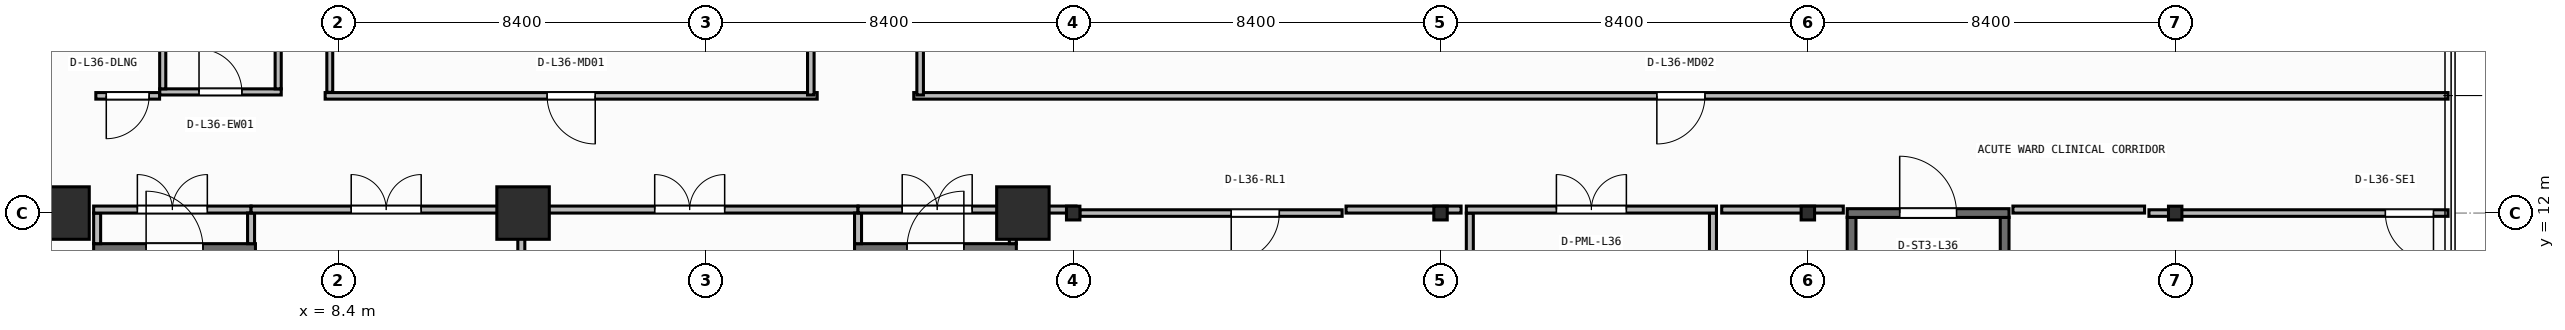
"""IFC4 building model, lengths in metres.
Left out: names, types, materials, properties, quantities, classifications, styles, units other than length and angle.
Written with IfcOpenShell. Run it as: python <this file> out.ifc"""

import sys

from ifc_helpers import new_model, si_unit, direction, frame, frame_2d, origin, origin_2d, place, context, subcontext, project, spatial, rectangle, i_section, extrude, element, fill, save


model = new_model("IFC4")
c1 = context("Model", 3, precision=1e-05, world=origin(), true_north=direction((0.0, 1.0)))
c2 = subcontext(c1, "Body", "Model", "MODEL_VIEW")
j1 = project(units=[si_unit("LENGTHUNIT", "METRE"), si_unit("PLANEANGLEUNIT", "RADIAN")], contexts=[c1])
p1 = place(None, origin())
s1 = spatial("IfcSite", under=j1, at=p1, CompositionType="ELEMENT")
p2 = place(p1, origin())
s2 = spatial("IfcBuilding", under=s1, at=p2, CompositionType="ELEMENT")
p3 = place(p2, frame((0.0, 0.0, 146.8)))
s3 = spatial("IfcBuildingStorey", under=s2, at=p3, CompositionType="ELEMENT", Elevation=146.8)
for number, where, z_axis, x_axis in (
    (1, (2.1, 12.0, 0.0), (0.0, 0.0, 1.0), (1.0, 0.0, 0.0)),
    (2, (12.62, 12.0, 0.0), (0.0, 0.0, 1.0), (1.0, 0.0, 0.0)),
    (3, (24.05, 12.0, 0.0), (0.0, 0.0, 1.0), (1.0, 0.0, 0.0)),
):
    element("IfcColumn", number, at=place(p3, frame(where, z_axis=z_axis, x_axis=x_axis)), inside=s3, PredefinedType="COLUMN", context=c2, shape_type="SweptSolid", body=[
        extrude(rectangle(XDim=1.2, YDim=1.2, at=origin_2d()), origin(), (0.0, 0.0, 1.0), 3.95),
    ])
for number, where, z_axis, x_axis in (
    (4, (25.2, 12.0, 0.0), (0.0, 0.0, 1.0), (1.0, 0.0, 0.0)),
    (5, (33.6, 12.0, 0.0), (0.0, 0.0, 1.0), (1.0, 0.0, 0.0)),
    (6, (42.0, 12.0, 0.0), (0.0, 0.0, 1.0), (1.0, 0.0, 0.0)),
    (7, (50.4, 12.0, 0.0), (0.0, 0.0, 1.0), (1.0, 0.0, 0.0)),
):
    element("IfcColumn", number, at=place(p3, frame(where, z_axis=z_axis, x_axis=x_axis)), inside=s3, PredefinedType="COLUMN", context=c2, shape_type="SweptSolid", body=[
        extrude(i_section(OverallWidth=0.307, OverallDepth=0.315, WebThickness=0.012, FlangeThickness=0.019, FilletRadius=0.017, at=origin_2d()), origin(), (0.0, 0.0, 1.0), 3.95),
    ])
p4 = place(p3, frame((2.8, 11.2, 0.0), z_axis=(0.0, 0.0, 1.0), x_axis=(1.0, 0.0, 0.0)))
e8 = element("IfcWall", 8, at=p4, inside=s3, PredefinedType="SHEAR", context=c2, shape_type="SweptSolid", body=[
    extrude(rectangle(XDim=3.7, YDim=0.2, at=frame_2d((1.85, 0.0))), origin(), (0.0, 0.0, 1.0), 3.71),
])
p5 = place(p4, frame((1.2, 0.0, 0.0)))
e9 = element("IfcOpeningElement", 9, at=p5, cuts=e8, PredefinedType="OPENING", context=c2, shape_type="SweptSolid", body=[
    extrude(rectangle(XDim=1.3, YDim=2.15, at=frame_2d((0.65, 1.075))), frame((0.0, 0.11, 0.0), z_axis=(0.0, -1.0, 0.0), x_axis=(1.0, 0.0, 0.0)), (0.0, 0.0, 1.0), 0.22),
])
p6 = place(p3, frame((20.2, 11.2, 0.0), z_axis=(0.0, 0.0, 1.0), x_axis=(1.0, 0.0, 0.0)))
e10 = element("IfcWall", 10, at=p6, inside=s3, PredefinedType="SHEAR", context=c2, shape_type="SweptSolid", body=[
    extrude(rectangle(XDim=3.7, YDim=0.2, at=frame_2d((1.85, 0.0))), origin(), (0.0, 0.0, 1.0), 3.71),
])
p7 = place(p6, frame((1.2, 0.0, 0.0)))
e11 = element("IfcOpeningElement", 11, at=p7, cuts=e10, PredefinedType="OPENING", context=c2, shape_type="SweptSolid", body=[
    extrude(rectangle(XDim=1.3, YDim=2.15, at=frame_2d((0.65, 1.075))), frame((0.0, 0.11, 0.0), z_axis=(0.0, -1.0, 0.0), x_axis=(1.0, 0.0, 0.0)), (0.0, 0.0, 1.0), 0.22),
])
for number, where, z_axis, x_axis in (
    (12, (43.0, 4.3, 0.0), (0.0, 0.0, 1.0), (0.0, 1.0, 0.0)),
    (13, (46.5, 4.3, 0.0), (0.0, 0.0, 1.0), (0.0, 1.0, 0.0)),
):
    element("IfcWall", number, at=place(p3, frame(where, z_axis=z_axis, x_axis=x_axis)), inside=s3, PredefinedType="SHEAR", context=c2, shape_type="SweptSolid", body=[
        extrude(rectangle(XDim=7.6, YDim=0.2, at=frame_2d((3.8, 0.0))), origin(), (0.0, 0.0, 1.0), 3.71),
    ])
p8 = place(p3, frame((42.9, 12.0, 0.0), z_axis=(0.0, 0.0, 1.0), x_axis=(1.0, 0.0, 0.0)))
e14 = element("IfcWall", 14, at=p8, inside=s3, PredefinedType="SHEAR", context=c2, shape_type="SweptSolid", body=[
    extrude(rectangle(XDim=3.7, YDim=0.2, at=frame_2d((1.85, 0.0))), origin(), (0.0, 0.0, 1.0), 3.71),
])
p9 = place(p8, frame((1.2, 0.0, 0.0)))
e15 = element("IfcOpeningElement", 15, at=p9, cuts=e14, PredefinedType="OPENING", context=c2, shape_type="SweptSolid", body=[
    extrude(rectangle(XDim=1.3, YDim=2.15, at=frame_2d((0.65, 1.075))), frame((0.0, 0.11, 0.0), z_axis=(0.0, -1.0, 0.0), x_axis=(1.0, 0.0, 0.0)), (0.0, 0.0, 1.0), 0.22),
])
p10 = place(p3, frame((2.88, 11.3, 0.0), z_axis=(0.0, 0.0, 1.0), x_axis=(0.0, 1.0, 0.0)))
e16 = element("IfcWall", 16, at=p10, inside=s3, PredefinedType="PARTITIONING", context=c2, shape_type="SweptSolid", body=[
    extrude(rectangle(XDim=0.7, YDim=0.16, at=frame_2d((0.35, 0.0))), origin(), (0.0, 0.0, 1.0), 3.71),
])
p11 = place(p3, frame((2.8, 12.08, 0.0), z_axis=(0.0, 0.0, 1.0), x_axis=(1.0, 0.0, 0.0)))
e17 = element("IfcWall", 17, at=p11, inside=s3, PredefinedType="PARTITIONING", context=c2, shape_type="SweptSolid", body=[
    extrude(rectangle(XDim=3.6, YDim=0.16, at=frame_2d((1.8, 0.0))), origin(), (0.0, 0.0, 1.0), 3.083),
])
p12 = place(p11, frame((1.0, 0.0, 0.0)))
e18 = element("IfcOpeningElement", 18, at=p12, cuts=e17, PredefinedType="OPENING", context=c2, shape_type="SweptSolid", body=[
    extrude(rectangle(XDim=1.6, YDim=2.05, at=frame_2d((0.8, 1.025))), frame((0.0, 0.09, 0.0), z_axis=(0.0, -1.0, 0.0), x_axis=(1.0, 0.0, 0.0)), (0.0, 0.0, 1.0), 0.18),
])
p13 = place(p3, frame((6.4, 11.3, 0.0), z_axis=(0.0, 0.0, 1.0), x_axis=(0.0, 1.0, 0.0)))
e19 = element("IfcWall", 19, at=p13, inside=s3, PredefinedType="PARTITIONING", context=c2, shape_type="SweptSolid", body=[
    extrude(rectangle(XDim=0.7, YDim=0.16, at=frame_2d((0.35, 0.0))), origin(), (0.0, 0.0, 1.0), 3.71),
])
p14 = place(p3, frame((6.4, 12.08, 0.0), z_axis=(0.0, 0.0, 1.0), x_axis=(1.0, 0.0, 0.0)))
e20 = element("IfcWall", 20, at=p14, inside=s3, PredefinedType="PARTITIONING", context=c2, shape_type="SweptSolid", body=[
    extrude(rectangle(XDim=6.18, YDim=0.16, at=frame_2d((3.09, 0.0))), origin(), (0.0, 0.0, 1.0), 3.083),
])
p15 = place(p14, frame((2.29, 0.0, 0.0)))
e21 = element("IfcOpeningElement", 21, at=p15, cuts=e20, PredefinedType="OPENING", context=c2, shape_type="SweptSolid", body=[
    extrude(rectangle(XDim=1.6, YDim=2.05, at=frame_2d((0.8, 1.025))), frame((0.0, 0.09, 0.0), z_axis=(0.0, -1.0, 0.0), x_axis=(1.0, 0.0, 0.0)), (0.0, 0.0, 1.0), 0.18),
])
p16 = place(p3, frame((12.58, 9.21, 0.0), z_axis=(0.0, 0.0, 1.0), x_axis=(0.0, 1.0, 0.0)))
e22 = element("IfcWall", 22, at=p16, inside=s3, PredefinedType="PARTITIONING", context=c2, shape_type="SweptSolid", body=[
    extrude(rectangle(XDim=2.79, YDim=0.16, at=frame_2d((1.395, 0.0))), origin(), (0.0, 0.0, 1.0), 3.71),
])
p17 = place(p3, frame((12.58, 12.08, 0.0), z_axis=(0.0, 0.0, 1.0), x_axis=(1.0, 0.0, 0.0)))
e23 = element("IfcWall", 23, at=p17, inside=s3, PredefinedType="PARTITIONING", context=c2, shape_type="SweptSolid", body=[
    extrude(rectangle(XDim=7.7, YDim=0.16, at=frame_2d((3.85, 0.0))), origin(), (0.0, 0.0, 1.0), 3.083),
])
p18 = place(p17, frame((3.05, 0.0, 0.0)))
e24 = element("IfcOpeningElement", 24, at=p18, cuts=e23, PredefinedType="OPENING", context=c2, shape_type="SweptSolid", body=[
    extrude(rectangle(XDim=1.6, YDim=2.05, at=frame_2d((0.8, 1.025))), frame((0.0, 0.09, 0.0), z_axis=(0.0, -1.0, 0.0), x_axis=(1.0, 0.0, 0.0)), (0.0, 0.0, 1.0), 0.18),
])
p19 = place(p3, frame((20.28, 11.3, 0.0), z_axis=(0.0, 0.0, 1.0), x_axis=(0.0, 1.0, 0.0)))
e25 = element("IfcWall", 25, at=p19, inside=s3, PredefinedType="PARTITIONING", context=c2, shape_type="SweptSolid", body=[
    extrude(rectangle(XDim=0.7, YDim=0.16, at=frame_2d((0.35, 0.0))), origin(), (0.0, 0.0, 1.0), 3.71),
])
p20 = place(p3, frame((20.28, 12.08, 0.0), z_axis=(0.0, 0.0, 1.0), x_axis=(1.0, 0.0, 0.0)))
e26 = element("IfcWall", 26, at=p20, inside=s3, PredefinedType="PARTITIONING", context=c2, shape_type="SweptSolid", body=[
    extrude(rectangle(XDim=3.62, YDim=0.16, at=frame_2d((1.81, 0.0))), origin(), (0.0, 0.0, 1.0), 3.083),
])
p21 = place(p20, frame((1.01, 0.0, 0.0)))
e27 = element("IfcOpeningElement", 27, at=p21, cuts=e26, PredefinedType="OPENING", context=c2, shape_type="SweptSolid", body=[
    extrude(rectangle(XDim=1.6, YDim=2.05, at=frame_2d((0.8, 1.025))), frame((0.0, 0.09, 0.0), z_axis=(0.0, -1.0, 0.0), x_axis=(1.0, 0.0, 0.0)), (0.0, 0.0, 1.0), 0.18),
])
p22 = place(p3, frame((23.82, 11.3, 0.0), z_axis=(0.0, 0.0, 1.0), x_axis=(0.0, 1.0, 0.0)))
e28 = element("IfcWall", 28, at=p22, inside=s3, PredefinedType="PARTITIONING", context=c2, shape_type="SweptSolid", body=[
    extrude(rectangle(XDim=0.7, YDim=0.16, at=frame_2d((0.35, 0.0))), origin(), (0.0, 0.0, 1.0), 3.71),
])
for number, where, z_axis, x_axis in (
    (29, (34.27, 8.61, 0.0), (0.0, 0.0, 1.0), (0.0, 1.0, 0.0)),
    (30, (39.83, 8.61, 0.0), (0.0, 0.0, 1.0), (0.0, 1.0, 0.0)),
):
    element("IfcWall", number, at=place(p3, frame(where, z_axis=z_axis, x_axis=x_axis)), inside=s3, PredefinedType="PARTITIONING", context=c2, shape_type="SweptSolid", body=[
        extrude(rectangle(XDim=3.39, YDim=0.16, at=frame_2d((1.695, 0.0))), origin(), (0.0, 0.0, 1.0), 3.71),
    ])
p23 = place(p3, frame((34.19, 12.08, 0.0), z_axis=(0.0, 0.0, 1.0), x_axis=(1.0, 0.0, 0.0)))
e31 = element("IfcWall", 31, at=p23, inside=s3, PredefinedType="PARTITIONING", context=c2, shape_type="SweptSolid", body=[
    extrude(rectangle(XDim=5.72, YDim=0.16, at=frame_2d((2.86, 0.0))), origin(), (0.0, 0.0, 1.0), 3.083),
])
p24 = place(p23, frame((2.06, 0.0, 0.0)))
e32 = element("IfcOpeningElement", 32, at=p24, cuts=e31, PredefinedType="OPENING", context=c2, shape_type="SweptSolid", body=[
    extrude(rectangle(XDim=1.6, YDim=2.05, at=frame_2d((0.8, 1.025))), frame((0.0, 0.09, 0.0), z_axis=(0.0, -1.0, 0.0), x_axis=(1.0, 0.0, 0.0)), (0.0, 0.0, 1.0), 0.18),
])
p25 = place(p3, frame((4.31, 14.77, 0.0), z_axis=(0.0, 0.0, 1.0), x_axis=(1.0, 0.0, 0.0)))
e33 = element("IfcWall", 33, at=p25, inside=s3, PredefinedType="PARTITIONING", context=c2, shape_type="SweptSolid", body=[
    extrude(rectangle(XDim=2.78, YDim=0.14, at=frame_2d((1.39, 0.0))), origin(), (0.0, 0.0, 1.0), 3.71),
])
p26 = place(p25, frame((0.9, 0.0, 0.0)))
e34 = element("IfcOpeningElement", 34, at=p26, cuts=e33, PredefinedType="OPENING", context=c2, shape_type="SweptSolid", body=[
    extrude(rectangle(XDim=0.98, YDim=2.1, at=frame_2d((0.49, 1.05))), frame((0.0, 0.08, 0.0), z_axis=(0.0, -1.0, 0.0), x_axis=(1.0, 0.0, 0.0)), (0.0, 0.0, 1.0), 0.16),
])
for number, where, z_axis, x_axis in (
    (35, (4.38, 14.84, 0.0), (0.0, 0.0, 1.0), (0.0, 1.0, 0.0)),
    (36, (7.02, 14.84, 0.0), (0.0, 0.0, 1.0), (0.0, 1.0, 0.0)),
):
    element("IfcWall", number, at=place(p3, frame(where, z_axis=z_axis, x_axis=x_axis)), inside=s3, PredefinedType="PARTITIONING", context=c2, shape_type="SweptSolid", body=[
        extrude(rectangle(XDim=2.2, YDim=0.14, at=frame_2d((1.1, 0.0))), origin(), (0.0, 0.0, 1.0), 3.71),
    ])
p27 = place(p3, frame((31.35, 12.0, 0.0), z_axis=(0.0, 0.0, 1.0), x_axis=(-1.0, 0.0, 0.0)))
e37 = element("IfcWall", 37, at=p27, inside=s3, PredefinedType="PARTITIONING", context=c2, shape_type="SweptSolid", body=[
    extrude(rectangle(XDim=5.997, YDim=0.15, at=frame_2d((2.998, 0.0))), origin(), (0.0, 0.0, 1.0), 3.083),
])
p28 = place(p27, frame((1.437, 0.0, 0.0)))
e38 = element("IfcOpeningElement", 38, at=p28, cuts=e37, PredefinedType="OPENING", context=c2, shape_type="SweptSolid", body=[
    extrude(rectangle(XDim=1.1, YDim=2.1, at=frame_2d((0.55, 1.05))), frame((0.0, 0.085, 0.0), z_axis=(0.0, -1.0, 0.0), x_axis=(1.0, 0.0, 0.0)), (0.0, 0.0, 1.0), 0.17),
])
p29 = place(p3, frame((56.64, 12.0, 0.0), z_axis=(0.0, 0.0, 1.0), x_axis=(-1.0, 0.0, 0.0)))
e39 = element("IfcWall", 39, at=p29, inside=s3, PredefinedType="PARTITIONING", context=c2, shape_type="SweptSolid", body=[
    extrude(rectangle(XDim=6.84, YDim=0.15, at=frame_2d((3.42, 0.0))), origin(), (0.0, 0.0, 1.0), 3.083),
])
p30 = place(p29, frame((0.333, 0.0, 0.0)))
e40 = element("IfcOpeningElement", 40, at=p30, cuts=e39, PredefinedType="OPENING", context=c2, shape_type="SweptSolid", body=[
    extrude(rectangle(XDim=1.1, YDim=2.1, at=frame_2d((0.55, 1.05))), frame((0.0, 0.085, 0.0), z_axis=(0.0, -1.0, 0.0), x_axis=(1.0, 0.0, 0.0)), (0.0, 0.0, 1.0), 0.17),
])
p31 = place(p3, frame((4.308, 14.68, 0.0), z_axis=(0.0, 0.0, 1.0), x_axis=(-1.0, 0.0, 0.0)))
e41 = element("IfcWall", 41, at=p31, inside=s3, PredefinedType="PARTITIONING", context=c2, shape_type="SweptSolid", body=[
    extrude(rectangle(XDim=1.458, YDim=0.15, at=frame_2d((0.729, 0.0))), origin(), (0.0, 0.0, 1.0), 3.71),
])
p32 = place(p31, frame((0.239, 0.0, 0.0)))
e42 = element("IfcOpeningElement", 42, at=p32, cuts=e41, PredefinedType="OPENING", context=c2, shape_type="SweptSolid", body=[
    extrude(rectangle(XDim=0.98, YDim=2.1, at=frame_2d((0.49, 1.05))), frame((0.0, 0.085, 0.0), z_axis=(0.0, -1.0, 0.0), x_axis=(1.0, 0.0, 0.0)), (0.0, 0.0, 1.0), 0.17),
])
p33 = place(p3, frame((19.346, 14.68, 0.0), z_axis=(0.0, 0.0, 1.0), x_axis=(-1.0, 0.0, 0.0)))
e43 = element("IfcWall", 43, at=p33, inside=s3, PredefinedType="PARTITIONING", context=c2, shape_type="SweptSolid", body=[
    extrude(rectangle(XDim=11.252, YDim=0.15, at=frame_2d((5.626, 0.0))), origin(), (0.0, 0.0, 1.0), 3.71),
])
p34 = place(p33, frame((5.076, 0.0, 0.0)))
e44 = element("IfcOpeningElement", 44, at=p34, cuts=e43, PredefinedType="OPENING", context=c2, shape_type="SweptSolid", body=[
    extrude(rectangle(XDim=1.1, YDim=2.1, at=frame_2d((0.55, 1.05))), frame((0.0, 0.085, 0.0), z_axis=(0.0, -1.0, 0.0), x_axis=(1.0, 0.0, 0.0)), (0.0, 0.0, 1.0), 0.17),
])
p35 = place(p3, frame((56.64, 14.68, 0.0), z_axis=(0.0, 0.0, 1.0), x_axis=(-1.0, 0.0, 0.0)))
e45 = element("IfcWall", 45, at=p35, inside=s3, PredefinedType="PARTITIONING", context=c2, shape_type="SweptSolid", body=[
    extrude(rectangle(XDim=35.086, YDim=0.15, at=frame_2d((17.543, 0.0))), origin(), (0.0, 0.0, 1.0), 3.71),
])
p36 = place(p35, frame((16.993, 0.0, 0.0)))
e46 = element("IfcOpeningElement", 46, at=p36, cuts=e45, PredefinedType="OPENING", context=c2, shape_type="SweptSolid", body=[
    extrude(rectangle(XDim=1.1, YDim=2.1, at=frame_2d((0.55, 1.05))), frame((0.0, 0.085, 0.0), z_axis=(0.0, -1.0, 0.0), x_axis=(1.0, 0.0, 0.0)), (0.0, 0.0, 1.0), 0.17),
])
p37 = place(p3, frame((19.2, 27.26, 0.0), z_axis=(0.0, 0.0, 1.0), x_axis=(0.0, -1.0, 0.0)))
e47 = element("IfcWall", 47, at=p37, inside=s3, PredefinedType="PARTITIONING", context=c2, shape_type="SweptSolid", body=[
    extrude(rectangle(XDim=12.56, YDim=0.15, at=frame_2d((6.28, 0.0))), origin(), (0.0, 0.0, 1.0), 3.71),
])
p38 = place(p3, frame((21.7, 14.7, 0.0), z_axis=(0.0, 0.0, 1.0), x_axis=(0.0, 1.0, 0.0)))
e48 = element("IfcWall", 48, at=p38, inside=s3, PredefinedType="PARTITIONING", context=c2, shape_type="SweptSolid", body=[
    extrude(rectangle(XDim=3.646, YDim=0.15, at=frame_2d((1.823, 0.0))), origin(), (0.0, 0.0, 1.0), 3.71),
])
p39 = place(p3, frame((8.2, 14.76, 0.0), z_axis=(0.0, 0.0, 1.0), x_axis=(0.0, 1.0, 0.0)))
e49 = element("IfcWall", 49, at=p39, inside=s3, PredefinedType="PARTITIONING", context=c2, shape_type="SweptSolid", body=[
    extrude(rectangle(XDim=12.34, YDim=0.135, at=frame_2d((6.17, 0.0))), origin(), (0.0, 0.0, 1.0), 3.152),
])
p40 = place(p3, frame((24.02, 12.08, 0.0), z_axis=(0.0, 0.0, 1.0), x_axis=(1.0, 0.0, 0.0)))
e50 = element("IfcWall", 50, at=p40, inside=s3, PredefinedType="PARTITIONING", context=c2, shape_type="SweptSolid", body=[
    extrude(rectangle(XDim=1.244, YDim=0.16, at=frame_2d((0.622, 0.0))), origin(), (0.0, 0.0, 1.0), 3.083),
])
p41 = place(p3, frame((31.439, 12.08, 0.0), z_axis=(0.0, 0.0, 1.0), x_axis=(1.0, 0.0, 0.0)))
e51 = element("IfcWall", 51, at=p41, inside=s3, PredefinedType="PARTITIONING", context=c2, shape_type="SweptSolid", body=[
    extrude(rectangle(XDim=2.631, YDim=0.16, at=frame_2d((1.315, 0.0))), origin(), (0.0, 0.0, 1.0), 3.083),
])
p42 = place(p3, frame((40.03, 12.08, 0.0), z_axis=(0.0, 0.0, 1.0), x_axis=(1.0, 0.0, 0.0)))
e52 = element("IfcWall", 52, at=p42, inside=s3, PredefinedType="PARTITIONING", context=c2, shape_type="SweptSolid", body=[
    extrude(rectangle(XDim=2.781, YDim=0.16, at=frame_2d((1.39, 0.0))), origin(), (0.0, 0.0, 1.0), 3.083),
])
p43 = place(p3, frame((46.689, 12.08, 0.0), z_axis=(0.0, 0.0, 1.0), x_axis=(1.0, 0.0, 0.0)))
e53 = element("IfcWall", 53, at=p43, inside=s3, PredefinedType="PARTITIONING", context=c2, shape_type="SweptSolid", body=[
    extrude(rectangle(XDim=3.011, YDim=0.16, at=frame_2d((1.505, 0.0))), origin(), (0.0, 0.0, 1.0), 3.083),
])
p44 = place(p5, origin())
e54 = element("IfcDoor", 54, at=p44, inside=s3, OperationType="SINGLE_SWING_LEFT", PredefinedType="DOOR", context=c2, shape_type="SweptSolid", body=[
    extrude(rectangle(XDim=1.3, YDim=2.15, at=frame_2d((0.65, 1.075))), frame((0.0, 0.025, 0.0), z_axis=(0.0, -1.0, 0.0), x_axis=(1.0, 0.0, 0.0)), (0.0, 0.0, 1.0), 0.05),
])
fill(e9, e54)
p45 = place(p7, origin())
e55 = element("IfcDoor", 55, at=p45, inside=s3, OperationType="SINGLE_SWING_RIGHT", PredefinedType="DOOR", context=c2, shape_type="SweptSolid", body=[
    extrude(rectangle(XDim=1.3, YDim=2.15, at=frame_2d((0.65, 1.075))), frame((0.0, 0.025, 0.0), z_axis=(0.0, -1.0, 0.0), x_axis=(1.0, 0.0, 0.0)), (0.0, 0.0, 1.0), 0.05),
])
fill(e11, e55)
p46 = place(p9, origin())
e56 = element("IfcDoor", 56, at=p46, inside=s3, OperationType="SINGLE_SWING_LEFT", PredefinedType="DOOR", context=c2, shape_type="SweptSolid", body=[
    extrude(rectangle(XDim=1.3, YDim=2.15, at=frame_2d((0.65, 1.075))), frame((0.0, 0.025, 0.0), z_axis=(0.0, -1.0, 0.0), x_axis=(1.0, 0.0, 0.0)), (0.0, 0.0, 1.0), 0.05),
])
fill(e15, e56)
p47 = place(p12, origin())
e57 = element("IfcDoor", 57, at=p47, inside=s3, OperationType="DOUBLE_DOOR_SINGLE_SWING", PredefinedType="DOOR", context=c2, shape_type="SweptSolid", body=[
    extrude(rectangle(XDim=1.6, YDim=2.05, at=frame_2d((0.8, 1.025))), frame((0.0, 0.025, 0.0), z_axis=(0.0, -1.0, 0.0), x_axis=(1.0, 0.0, 0.0)), (0.0, 0.0, 1.0), 0.05),
])
fill(e18, e57)
p48 = place(p15, origin())
e58 = element("IfcDoor", 58, at=p48, inside=s3, OperationType="DOUBLE_DOOR_SINGLE_SWING", PredefinedType="DOOR", context=c2, shape_type="SweptSolid", body=[
    extrude(rectangle(XDim=1.6, YDim=2.05, at=frame_2d((0.8, 1.025))), frame((0.0, 0.025, 0.0), z_axis=(0.0, -1.0, 0.0), x_axis=(1.0, 0.0, 0.0)), (0.0, 0.0, 1.0), 0.05),
])
fill(e21, e58)
p49 = place(p18, origin())
e59 = element("IfcDoor", 59, at=p49, inside=s3, OperationType="DOUBLE_DOOR_SINGLE_SWING", PredefinedType="DOOR", context=c2, shape_type="SweptSolid", body=[
    extrude(rectangle(XDim=1.6, YDim=2.05, at=frame_2d((0.8, 1.025))), frame((0.0, 0.025, 0.0), z_axis=(0.0, -1.0, 0.0), x_axis=(1.0, 0.0, 0.0)), (0.0, 0.0, 1.0), 0.05),
])
fill(e24, e59)
p50 = place(p21, origin())
e60 = element("IfcDoor", 60, at=p50, inside=s3, OperationType="DOUBLE_DOOR_SINGLE_SWING", PredefinedType="DOOR", context=c2, shape_type="SweptSolid", body=[
    extrude(rectangle(XDim=1.6, YDim=2.05, at=frame_2d((0.8, 1.025))), frame((0.0, 0.025, 0.0), z_axis=(0.0, -1.0, 0.0), x_axis=(1.0, 0.0, 0.0)), (0.0, 0.0, 1.0), 0.05),
])
fill(e27, e60)
p51 = place(p24, origin())
e61 = element("IfcDoor", 61, at=p51, inside=s3, OperationType="DOUBLE_DOOR_SINGLE_SWING", PredefinedType="DOOR", context=c2, shape_type="SweptSolid", body=[
    extrude(rectangle(XDim=1.6, YDim=2.05, at=frame_2d((0.8, 1.025))), frame((0.0, 0.025, 0.0), z_axis=(0.0, -1.0, 0.0), x_axis=(1.0, 0.0, 0.0)), (0.0, 0.0, 1.0), 0.05),
])
fill(e32, e61)
p52 = place(p26, origin())
e62 = element("IfcDoor", 62, at=p52, inside=s3, OperationType="SINGLE_SWING_LEFT", PredefinedType="DOOR", context=c2, shape_type="SweptSolid", body=[
    extrude(rectangle(XDim=0.98, YDim=2.1, at=frame_2d((0.49, 1.05))), frame((0.0, 0.025, 0.0), z_axis=(0.0, -1.0, 0.0), x_axis=(1.0, 0.0, 0.0)), (0.0, 0.0, 1.0), 0.05),
])
fill(e34, e62)
p53 = place(p28, origin())
e63 = element("IfcDoor", 63, at=p53, inside=s3, OperationType="SINGLE_SWING_RIGHT", PredefinedType="DOOR", context=c2, shape_type="SweptSolid", body=[
    extrude(rectangle(XDim=1.1, YDim=2.1, at=frame_2d((0.55, 1.05))), frame((0.0, 0.025, 0.0), z_axis=(0.0, -1.0, 0.0), x_axis=(1.0, 0.0, 0.0)), (0.0, 0.0, 1.0), 0.05),
])
fill(e38, e63)
p54 = place(p30, origin())
e64 = element("IfcDoor", 64, at=p54, inside=s3, OperationType="SINGLE_SWING_LEFT", PredefinedType="DOOR", context=c2, shape_type="SweptSolid", body=[
    extrude(rectangle(XDim=1.1, YDim=2.1, at=frame_2d((0.55, 1.05))), frame((0.0, 0.025, 0.0), z_axis=(0.0, -1.0, 0.0), x_axis=(1.0, 0.0, 0.0)), (0.0, 0.0, 1.0), 0.05),
])
fill(e40, e64)
p55 = place(p32, origin())
e65 = element("IfcDoor", 65, at=p55, inside=s3, OperationType="SINGLE_SWING_RIGHT", PredefinedType="DOOR", context=c2, shape_type="SweptSolid", body=[
    extrude(rectangle(XDim=0.98, YDim=2.1, at=frame_2d((0.49, 1.05))), frame((0.0, 0.025, 0.0), z_axis=(0.0, -1.0, 0.0), x_axis=(1.0, 0.0, 0.0)), (0.0, 0.0, 1.0), 0.05),
])
fill(e42, e65)
p56 = place(p34, origin())
e66 = element("IfcDoor", 66, at=p56, inside=s3, OperationType="SINGLE_SWING_LEFT", PredefinedType="DOOR", context=c2, shape_type="SweptSolid", body=[
    extrude(rectangle(XDim=1.1, YDim=2.1, at=frame_2d((0.55, 1.05))), frame((0.0, 0.025, 0.0), z_axis=(0.0, -1.0, 0.0), x_axis=(1.0, 0.0, 0.0)), (0.0, 0.0, 1.0), 0.05),
])
fill(e44, e66)
p57 = place(p36, origin())
e67 = element("IfcDoor", 67, at=p57, inside=s3, OperationType="SINGLE_SWING_RIGHT", PredefinedType="DOOR", context=c2, shape_type="SweptSolid", body=[
    extrude(rectangle(XDim=1.1, YDim=2.1, at=frame_2d((0.55, 1.05))), frame((0.0, 0.025, 0.0), z_axis=(0.0, -1.0, 0.0), x_axis=(1.0, 0.0, 0.0)), (0.0, 0.0, 1.0), 0.05),
])
fill(e46, e67)
save(model, sys.argv[1])
